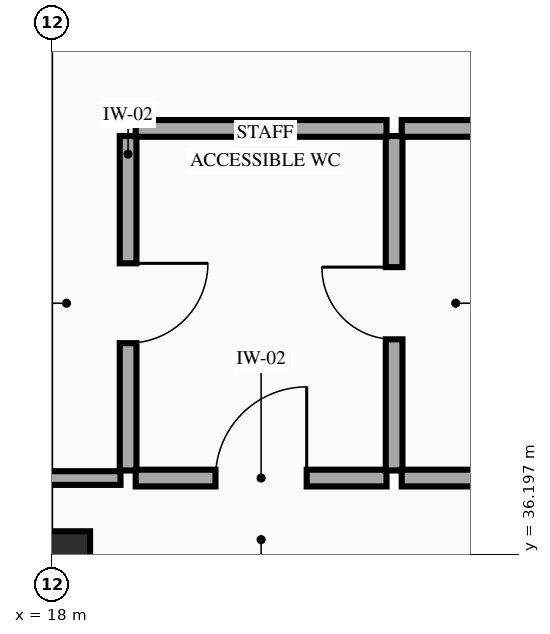
"""IFC4 building model, lengths in metres.
Left out: names, types, materials, properties, quantities, classifications, styles, units other than length and angle.
Written with IfcOpenShell. Run it as: python <this file> out.ifc"""

import sys

from ifc_helpers import new_model, si_unit, direction, frame, frame_2d, origin, origin_2d, place, context, subcontext, project, spatial, rectangle, extrude, element, fill, save


model = new_model("IFC4")
c1 = context("Model", 3, precision=1e-05, world=origin(), true_north=direction((0.0, 1.0)))
c2 = subcontext(c1, "Body", "Model", "MODEL_VIEW")
j1 = project(units=[si_unit("LENGTHUNIT", "METRE"), si_unit("PLANEANGLEUNIT", "RADIAN")], contexts=[c1])
p1 = place(None, origin())
s1 = spatial("IfcSite", under=j1, at=p1, CompositionType="ELEMENT")
p2 = place(p1, origin())
s2 = spatial("IfcBuilding", under=s1, at=p2, CompositionType="ELEMENT")
p3 = place(p2, frame((0.0, 0.0, -6.0)))
s3 = spatial("IfcBuildingStorey", under=s2, at=p3, CompositionType="ELEMENT", Elevation=-6.0)
p4 = place(p3, frame((18.0, 36.0, 0.0), z_axis=(0.0, 0.0, 1.0), x_axis=(1.0, 0.0, 0.0)))
e1 = element("IfcColumn", 1, at=p4, inside=s3, PredefinedType="COLUMN", context=c2, shape_type="SweptSolid", body=[
    extrude(rectangle(XDim=1.0, YDim=1.0, at=origin_2d()), origin(), (0.0, 0.0, 1.0), 6.0),
])
p5 = place(p3, frame((19.0, 41.7, 0.0), z_axis=(0.0, 0.0, 1.0), x_axis=(0.0, -1.0, 0.0)))
e2 = element("IfcWall", 2, at=p5, inside=s3, PredefinedType="PLUMBINGWALL", context=c2, shape_type="SweptSolid", body=[
    extrude(rectangle(XDim=4.4, YDim=0.22, at=frame_2d((2.2, 0.0))), origin(), (0.0, 0.0, 1.0), 5.235),
])
p6 = place(p5, frame((1.675, 0.0, 0.0)))
e3 = element("IfcOpeningElement", 3, at=p6, cuts=e2, PredefinedType="OPENING", context=c2, shape_type="SweptSolid", body=[
    extrude(rectangle(XDim=1.05, YDim=2.15, at=frame_2d((0.525, 1.075))), frame((0.0, 0.12, 0.0), z_axis=(0.0, -1.0, 0.0), x_axis=(1.0, 0.0, 0.0)), (0.0, 0.0, 1.0), 0.24),
])
p7 = place(p3, frame((19.1, 37.2, 0.0), z_axis=(0.0, 0.0, 1.0), x_axis=(1.0, 0.0, 0.0)))
e4 = element("IfcWall", 4, at=p7, inside=s3, PredefinedType="PLUMBINGWALL", context=c2, shape_type="SweptSolid", body=[
    extrude(rectangle(XDim=3.3, YDim=0.22, at=frame_2d((1.65, 0.0))), origin(), (0.0, 0.0, 1.0), 5.65),
])
p8 = place(p7, frame((1.05, 0.0, 0.0)))
e5 = element("IfcOpeningElement", 5, at=p8, cuts=e4, PredefinedType="OPENING", context=c2, shape_type="SweptSolid", body=[
    extrude(rectangle(XDim=1.2, YDim=2.2, at=frame_2d((0.6, 1.1))), frame((0.0, 0.12, 0.0), z_axis=(0.0, -1.0, 0.0), x_axis=(1.0, 0.0, 0.0)), (0.0, 0.0, 1.0), 0.24),
])
p9 = place(p3, frame((22.5, 37.3, 0.0), z_axis=(0.0, 0.0, 1.0), x_axis=(0.0, 1.0, 0.0)))
e6 = element("IfcWall", 6, at=p9, inside=s3, PredefinedType="PLUMBINGWALL", context=c2, shape_type="SweptSolid", body=[
    extrude(rectangle(XDim=4.4, YDim=0.22, at=frame_2d((2.2, 0.0))), origin(), (0.0, 0.0, 1.0), 5.235),
])
p10 = place(p9, frame((1.725, 0.0, 0.0)))
e7 = element("IfcOpeningElement", 7, at=p10, cuts=e6, PredefinedType="OPENING", context=c2, shape_type="SweptSolid", body=[
    extrude(rectangle(XDim=0.95, YDim=2.15, at=frame_2d((0.475, 1.075))), frame((0.0, 0.12, 0.0), z_axis=(0.0, -1.0, 0.0), x_axis=(1.0, 0.0, 0.0)), (0.0, 0.0, 1.0), 0.24),
])
p11 = place(p3, frame((22.4, 41.8, 0.0), z_axis=(0.0, 0.0, 1.0), x_axis=(-1.0, 0.0, 0.0)))
e8 = element("IfcWall", 8, at=p11, inside=s3, PredefinedType="PLUMBINGWALL", context=c2, shape_type="SweptSolid", body=[
    extrude(rectangle(XDim=3.3, YDim=0.22, at=frame_2d((1.65, 0.0))), origin(), (0.0, 0.0, 1.0), 5.285),
])
p12 = place(p3, frame((22.6, 37.2, 0.0), z_axis=(0.0, 0.0, 1.0), x_axis=(1.0, 0.0, 0.0)))
e9 = element("IfcWall", 9, at=p12, inside=s3, PredefinedType="PLUMBINGWALL", context=c2, shape_type="SweptSolid", body=[
    extrude(rectangle(XDim=3.3, YDim=0.22, at=frame_2d((1.65, 0.0))), origin(), (0.0, 0.0, 1.0), 5.65),
])
p13 = place(p3, frame((25.9, 41.8, 0.0), z_axis=(0.0, 0.0, 1.0), x_axis=(-1.0, 0.0, 0.0)))
e10 = element("IfcWall", 10, at=p13, inside=s3, PredefinedType="PLUMBINGWALL", context=c2, shape_type="SweptSolid", body=[
    extrude(rectangle(XDim=3.3, YDim=0.22, at=frame_2d((1.65, 0.0))), origin(), (0.0, 0.0, 1.0), 5.285),
])
p14 = place(p3, frame((16.105, 37.2, 0.0), z_axis=(0.0, 0.0, 1.0), x_axis=(1.0, 0.0, 0.0)))
e11 = element("IfcWall", 11, at=p14, inside=s3, PredefinedType="PARTITIONING", context=c2, shape_type="SweptSolid", body=[
    extrude(rectangle(XDim=2.795, YDim=0.18, at=frame_2d((1.397, 0.0))), origin(), (0.0, 0.0, 1.0), 4.835),
])
p15 = place(p6, origin())
e12 = element("IfcDoor", 12, at=p15, inside=s3, OperationType="SINGLE_SWING_LEFT", PredefinedType="DOOR", context=c2, shape_type="SweptSolid", body=[
    extrude(rectangle(XDim=1.05, YDim=2.15, at=frame_2d((0.525, 1.075))), frame((0.0, 0.025, 0.0), z_axis=(0.0, -1.0, 0.0), x_axis=(1.0, 0.0, 0.0)), (0.0, 0.0, 1.0), 0.05),
])
fill(e3, e12)
p16 = place(p10, origin())
e13 = element("IfcDoor", 13, at=p16, inside=s3, OperationType="SINGLE_SWING_RIGHT", PredefinedType="DOOR", context=c2, shape_type="SweptSolid", body=[
    extrude(rectangle(XDim=0.95, YDim=2.15, at=frame_2d((0.475, 1.075))), frame((0.0, 0.025, 0.0), z_axis=(0.0, -1.0, 0.0), x_axis=(1.0, 0.0, 0.0)), (0.0, 0.0, 1.0), 0.05),
])
fill(e7, e13)
p17 = place(p8, origin())
e14 = element("IfcDoor", 14, at=p17, inside=s3, OperationType="SINGLE_SWING_RIGHT", PredefinedType="DOOR", context=c2, shape_type="SweptSolid", body=[
    extrude(rectangle(XDim=1.2, YDim=2.2, at=frame_2d((0.6, 1.1))), frame((0.0, 0.025, 0.0), z_axis=(0.0, -1.0, 0.0), x_axis=(1.0, 0.0, 0.0)), (0.0, 0.0, 1.0), 0.05),
])
fill(e5, e14)
save(model, sys.argv[1])
